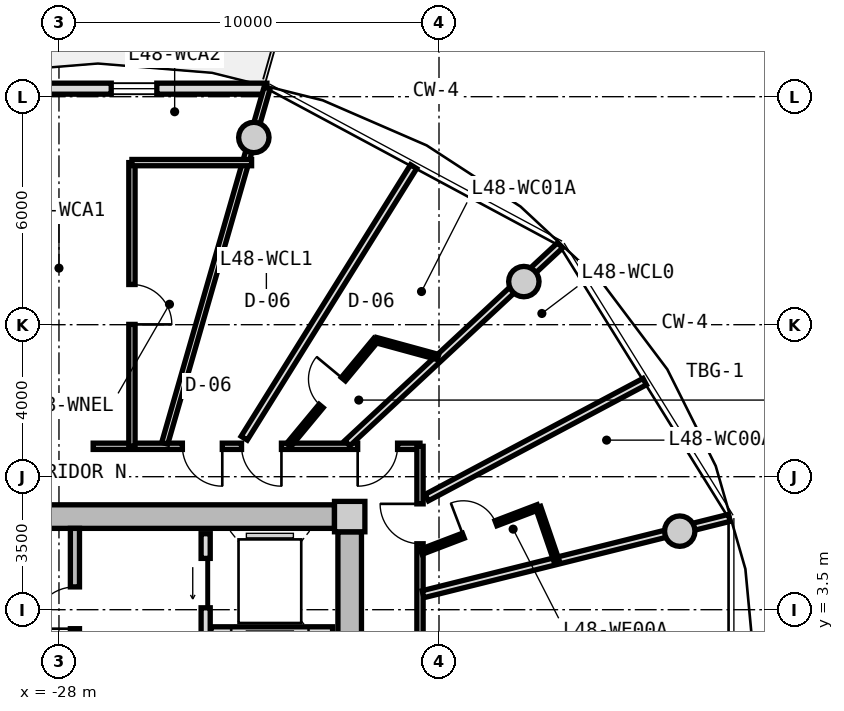
"""IFC4 building model, lengths in metres.
Left out: names, types, materials, properties, quantities, classifications, styles, units other than length and angle.
Written with IfcOpenShell. Run it as: python <this file> out.ifc"""

import sys

from ifc_helpers import new_model, si_unit, direction, frame, frame_2d, origin, origin_2d, place, context, subcontext, project, spatial, rectangle, circle, extrude, source, transform, mapped, element, fill, save


model = new_model("IFC4")
c1 = context("Model", 3, precision=1e-05, world=origin(), true_north=direction((0.0, 1.0)))
c2 = subcontext(c1, "Body", "Model", "MODEL_VIEW")
j1 = project(units=[si_unit("LENGTHUNIT", "METRE"), si_unit("PLANEANGLEUNIT", "RADIAN")], contexts=[c1])
p1 = place(None, origin())
s1 = spatial("IfcSite", under=j1, at=p1, CompositionType="ELEMENT")
p2 = place(p1, origin())
s2 = spatial("IfcBuilding", under=s1, at=p2, CompositionType="ELEMENT")
p3 = place(p2, frame((0.0, 0.0, 155.65)))
s3 = spatial("IfcBuildingStorey", under=s2, at=p3, CompositionType="ELEMENT", Elevation=155.65)
m1 = source(origin(), c2, "Body", "SweptSolid", [
    extrude(rectangle(XDim=0.8, YDim=0.8, at=origin_2d()), origin(), (0.0, 0.0, 1.0), 3.05),
])
p4 = place(p3, frame((-20.35, 5.95, 0.0), z_axis=(0.0, 0.0, 1.0), x_axis=(1.0, 0.0, 0.0)))
e1 = element("IfcColumn", 1, at=p4, inside=s3, PredefinedType="COLUMN", context=c2, shape_type="MappedRepresentation", body=[
    mapped(m1, transform((0.0, 0.0, 0.0), x_axis=(1.0, 0.0, 0.0), y_axis=(0.0, 1.0, 0.0), z_axis=(0.0, 0.0, 1.0), scale=1.0)),
])
m2 = source(origin(), c2, "Body", "SweptSolid", [
    extrude(rectangle(XDim=14.5, YDim=0.62, at=frame_2d((7.25, 0.0))), origin(), (0.0, 0.0, 1.0), 2.81),
])
p5 = place(p3, frame((-35.25, 5.95, 0.0), z_axis=(0.0, 0.0, 1.0), x_axis=(1.0, 0.0, 0.0)))
e2 = element("IfcWall", 2, at=p5, inside=s3, PredefinedType="SHEAR", context=c2, shape_type="MappedRepresentation", body=[
    mapped(m2, transform((0.0, 0.0, 0.0), x_axis=(1.0, 0.0, 0.0), y_axis=(0.0, 1.0, 0.0), z_axis=(0.0, 0.0, 1.0), scale=1.0)),
])
m3 = source(origin(), c2, "Body", "SweptSolid", [
    extrude(rectangle(XDim=11.1, YDim=0.62, at=frame_2d((5.55, 0.0))), origin(), (0.0, 0.0, 1.0), 2.81),
])
p6 = place(p3, frame((-20.35, 5.55, 0.0), z_axis=(0.0, 0.0, 1.0), x_axis=(0.0, -1.0, 0.0)))
e3 = element("IfcWall", 3, at=p6, inside=s3, PredefinedType="SHEAR", context=c2, shape_type="MappedRepresentation", body=[
    mapped(m3, transform((0.0, 0.0, 0.0), x_axis=(1.0, 0.0, 0.0), y_axis=(0.0, 1.0, 0.0), z_axis=(0.0, 0.0, 1.0), scale=1.0)),
])
p7 = place(p6, frame((5.65, 0.0, 0.0)))
e4 = element("IfcOpeningElement", 4, at=p7, cuts=e3, PredefinedType="OPENING", context=c2, shape_type="SweptSolid", body=[
    extrude(rectangle(XDim=1.2, YDim=2.15, at=frame_2d((0.6, 1.075))), frame((0.0, 0.32, 0.0), z_axis=(0.0, -1.0, 0.0), x_axis=(1.0, 0.0, 0.0)), (0.0, 0.0, 1.0), 0.64),
])
m4 = source(origin(), c2, "Body", "SweptSolid", [
    extrude(circle(Radius=0.4, at=origin_2d()), origin(), (0.0, 0.0, 1.0), 3.05),
])
for number, where, z_axis, x_axis in (
    (5, (-11.665, 5.567, 0.0), (0.0, 0.0, 1.0), (1.0, 0.0, 0.0)),
    (6, (-15.767, 12.135, 0.0), (0.0, 0.0, 1.0), (1.0, 0.0, 0.0)),
    (7, (-22.873, 15.926, 0.0), (0.0, 0.0, 1.0), (1.0, 0.0, 0.0)),
):
    element("IfcColumn", number, at=place(p3, frame(where, z_axis=z_axis, x_axis=x_axis)), inside=s3, PredefinedType="COLUMN", context=c2, shape_type="MappedRepresentation", body=[
        mapped(m4, transform((0.0, 0.0, 0.0), x_axis=(1.0, 0.0, 0.0), y_axis=(0.0, 1.0, 0.0), z_axis=(0.0, 0.0, 1.0), scale=1.0)),
    ])
m5 = source(origin(), c2, "Body", "SweptSolid", [
    extrude(rectangle(XDim=8.893, YDim=0.29, at=frame_2d((4.447, 0.0))), origin(), (0.0, 0.0, 1.0), 2.81),
])
p8 = place(p3, frame((-31.422, 17.211, 0.0), z_axis=(0.0, 0.0, 1.0), x_axis=(1.0, 0.0, 0.0)))
e8 = element("IfcWall", 8, at=p8, inside=s3, PredefinedType="SOLIDWALL", context=c2, shape_type="MappedRepresentation", body=[
    mapped(m5, transform((0.0, 0.0, 0.0), x_axis=(1.0, 0.0, 0.0), y_axis=(0.0, 1.0, 0.0), z_axis=(0.0, 0.0, 1.0), scale=1.0)),
])
p9 = place(p8, frame((0.9, 0.0, 0.0)))
e9 = element("IfcOpeningElement", 9, at=p9, cuts=e8, PredefinedType="OPENING", context=c2, shape_type="SweptSolid", body=[
    extrude(rectangle(XDim=1.15, YDim=2.25, at=frame_2d((0.575, 1.125))), frame((0.0, 0.155, 0.0), z_axis=(0.0, -1.0, 0.0), x_axis=(1.0, 0.0, 0.0)), (0.0, 0.0, 1.0), 0.31),
])
p10 = place(p8, frame((4.796, 0.0, 0.85)))
e10 = element("IfcOpeningElement", 10, at=p10, cuts=e8, PredefinedType="OPENING", context=c2, shape_type="SweptSolid", body=[
    extrude(rectangle(XDim=1.2, YDim=1.5, at=frame_2d((0.6, 0.75))), frame((0.0, 0.155, 0.0), z_axis=(0.0, -1.0, 0.0), x_axis=(1.0, 0.0, 0.0)), (0.0, 0.0, 1.0), 0.31),
])
m6 = source(origin(), c2, "Body", "SweptSolid", [
    extrude(rectangle(XDim=3.19, YDim=0.24, at=frame_2d((1.595, 0.0))), origin(), (0.0, 0.0, 1.0), 2.81),
])
p11 = place(p3, frame((-27.58, 2.45, 0.0), z_axis=(0.0, 0.0, 1.0), x_axis=(0.0, 1.0, 0.0)))
e11 = element("IfcWall", 11, at=p11, inside=s3, PredefinedType="PARTITIONING", context=c2, shape_type="MappedRepresentation", body=[
    mapped(m6, transform((0.0, 0.0, 0.0), x_axis=(1.0, 0.0, 0.0), y_axis=(0.0, 1.0, 0.0), z_axis=(0.0, 0.0, 1.0), scale=1.0)),
])
p12 = place(p11, frame((0.55, 0.0, 0.0)))
e12 = element("IfcOpeningElement", 12, at=p12, cuts=e11, PredefinedType="OPENING", context=c2, shape_type="SweptSolid", body=[
    extrude(rectangle(XDim=1.1, YDim=2.15, at=frame_2d((0.55, 1.075))), frame((0.0, 0.13, 0.0), z_axis=(0.0, -1.0, 0.0), x_axis=(1.0, 0.0, 0.0)), (0.0, 0.0, 1.0), 0.26),
])
m7 = source(origin(), c2, "Body", "SweptSolid", [
    extrude(rectangle(XDim=5.0, YDim=0.24, at=frame_2d((2.5, 0.0))), origin(), (0.0, 0.0, 1.0), 2.795),
])
p13 = place(p3, frame((-24.14, 0.5, 0.0), z_axis=(0.0, 0.0, 1.0), x_axis=(0.0, 1.0, 0.0)))
e13 = element("IfcWall", 13, at=p13, inside=s3, PredefinedType="PARTITIONING", context=c2, shape_type="MappedRepresentation", body=[
    mapped(m7, transform((0.0, 0.0, 0.0), x_axis=(1.0, 0.0, 0.0), y_axis=(0.0, 1.0, 0.0), z_axis=(0.0, 0.0, 1.0), scale=1.0)),
])
p14 = place(p13, frame((3.05, 0.0, 0.0)))
e14 = element("IfcOpeningElement", 14, at=p14, cuts=e13, PredefinedType="OPENING", context=c2, shape_type="SweptSolid", body=[
    extrude(rectangle(XDim=1.3, YDim=2.2, at=frame_2d((0.65, 1.1))), frame((0.0, 0.13, 0.0), z_axis=(0.0, -1.0, 0.0), x_axis=(1.0, 0.0, 0.0)), (0.0, 0.0, 1.0), 0.26),
])
p15 = place(p13, frame((0.55, 0.0, 0.0)))
e15 = element("IfcOpeningElement", 15, at=p15, cuts=e13, PredefinedType="OPENING", context=c2, shape_type="SweptSolid", body=[
    extrude(rectangle(XDim=1.3, YDim=2.2, at=frame_2d((0.65, 1.1))), frame((0.0, 0.13, 0.0), z_axis=(0.0, -1.0, 0.0), x_axis=(1.0, 0.0, 0.0)), (0.0, 0.0, 1.0), 0.26),
])
m8 = source(origin(), c2, "Body", "SweptSolid", [
    extrude(rectangle(XDim=3.2, YDim=0.2, at=frame_2d((1.6, 0.0))), origin(), (0.0, 0.0, 1.0), 2.795),
])
p16 = place(p3, frame((-24.0, 2.95, 0.0), z_axis=(0.0, 0.0, 1.0), x_axis=(1.0, 0.0, 0.0)))
e16 = element("IfcWall", 16, at=p16, inside=s3, PredefinedType="PARTITIONING", context=c2, shape_type="MappedRepresentation", body=[
    mapped(m8, transform((0.0, 0.0, 0.0), x_axis=(1.0, 0.0, 0.0), y_axis=(0.0, 1.0, 0.0), z_axis=(0.0, 0.0, 1.0), scale=1.0)),
])
m9 = source(origin(), c2, "Body", "SweptSolid", [
    extrude(rectangle(XDim=8.6, YDim=0.165, at=frame_2d((4.3, 0.0))), origin(), (0.0, 0.0, 1.0), 2.795),
])
p17 = place(p3, frame((-27.1, 7.8, 0.0), z_axis=(0.0, 0.0, 1.0), x_axis=(1.0, 0.0, 0.0)))
e17 = element("IfcWall", 17, at=p17, inside=s3, PredefinedType="PARTITIONING", context=c2, shape_type="MappedRepresentation", body=[
    mapped(m9, transform((0.0, 0.0, 0.0), x_axis=(1.0, 0.0, 0.0), y_axis=(0.0, 1.0, 0.0), z_axis=(0.0, 0.0, 1.0), scale=1.0)),
])
p18 = place(p17, frame((6.96, 0.0, 0.0)))
e18 = element("IfcOpeningElement", 18, at=p18, cuts=e17, PredefinedType="OPENING", context=c2, shape_type="SweptSolid", body=[
    extrude(rectangle(XDim=1.05, YDim=2.15, at=frame_2d((0.525, 1.075))), frame((0.0, 0.093, 0.0), z_axis=(0.0, -1.0, 0.0), x_axis=(1.0, 0.0, 0.0)), (0.0, 0.0, 1.0), 0.185),
])
p19 = place(p17, frame((3.904, 0.0, 0.0)))
e19 = element("IfcOpeningElement", 19, at=p19, cuts=e17, PredefinedType="OPENING", context=c2, shape_type="SweptSolid", body=[
    extrude(rectangle(XDim=1.05, YDim=2.15, at=frame_2d((0.525, 1.075))), frame((0.0, 0.093, 0.0), z_axis=(0.0, -1.0, 0.0), x_axis=(1.0, 0.0, 0.0)), (0.0, 0.0, 1.0), 0.185),
])
p20 = place(p17, frame((2.347, 0.0, 0.0)))
e20 = element("IfcOpeningElement", 20, at=p20, cuts=e17, PredefinedType="OPENING", context=c2, shape_type="SweptSolid", body=[
    extrude(rectangle(XDim=1.05, YDim=2.15, at=frame_2d((0.525, 1.075))), frame((0.0, 0.093, 0.0), z_axis=(0.0, -1.0, 0.0), x_axis=(1.0, 0.0, 0.0)), (0.0, 0.0, 1.0), 0.185),
])
m10 = source(origin(), c2, "Body", "SweptSolid", [
    extrude(rectangle(XDim=15.6, YDim=0.165, at=frame_2d((7.8, 0.0))), origin(), (0.0, 0.0, 1.0), 2.795),
])
p21 = place(p3, frame((-18.5, 7.8, 0.0), z_axis=(0.0, 0.0, 1.0), x_axis=(0.0, -1.0, 0.0)))
e21 = element("IfcWall", 21, at=p21, inside=s3, PredefinedType="PARTITIONING", context=c2, shape_type="MappedRepresentation", body=[
    mapped(m10, transform((0.0, 0.0, 0.0), x_axis=(1.0, 0.0, 0.0), y_axis=(0.0, 1.0, 0.0), z_axis=(0.0, 0.0, 1.0), scale=1.0)),
])
p22 = place(p21, frame((8.314, 0.0, 0.0)))
e22 = element("IfcOpeningElement", 22, at=p22, cuts=e21, PredefinedType="OPENING", context=c2, shape_type="SweptSolid", body=[
    extrude(rectangle(XDim=1.25, YDim=2.2, at=frame_2d((0.625, 1.1))), frame((0.0, 0.093, 0.0), z_axis=(0.0, -1.0, 0.0), x_axis=(1.0, 0.0, 0.0)), (0.0, 0.0, 1.0), 0.185),
])
p23 = place(p21, frame((1.515, 0.0, 0.0)))
e23 = element("IfcOpeningElement", 23, at=p23, cuts=e21, PredefinedType="OPENING", context=c2, shape_type="SweptSolid", body=[
    extrude(rectangle(XDim=1.05, YDim=2.15, at=frame_2d((0.525, 1.075))), frame((0.0, 0.093, 0.0), z_axis=(0.0, -1.0, 0.0), x_axis=(1.0, 0.0, 0.0)), (0.0, 0.0, 1.0), 0.185),
])
m11 = source(origin(), c2, "Body", "SweptSolid", [
    extrude(rectangle(XDim=9.73, YDim=0.165, at=frame_2d((4.865, 0.0))), origin(), (0.0, 0.0, 1.0), 2.345),
])
p24 = place(p3, frame((-25.217, 7.88, 0.0), z_axis=(0.0, 0.0, 1.0), x_axis=(0.27679492614, 0.960929013436, 0.0)))
e24 = element("IfcWall", 24, at=p24, inside=s3, PredefinedType="PARTITIONING", context=c2, shape_type="MappedRepresentation", body=[
    mapped(m11, transform((0.0, 0.0, 0.0), x_axis=(1.0, 0.0, 0.0), y_axis=(0.0, 1.0, 0.0), z_axis=(0.0, 0.0, 1.0), scale=1.0)),
])
m12 = source(origin(), c2, "Body", "SweptSolid", [
    extrude(rectangle(XDim=7.465, YDim=0.165, at=frame_2d((3.733, 0.0))), origin(), (0.0, 0.0, 1.0), 2.795),
])
p25 = place(p3, frame((-26.08, 7.8, 0.0), z_axis=(0.0, 0.0, 1.0), x_axis=(0.0, 1.0, 0.0)))
e25 = element("IfcWall", 25, at=p25, inside=s3, PredefinedType="PARTITIONING", context=c2, shape_type="MappedRepresentation", body=[
    mapped(m12, transform((0.0, 0.0, 0.0), x_axis=(1.0, 0.0, 0.0), y_axis=(0.0, 1.0, 0.0), z_axis=(0.0, 0.0, 1.0), scale=1.0)),
])
p26 = place(p25, frame((3.208, 0.0, 0.0)))
e26 = element("IfcOpeningElement", 26, at=p26, cuts=e25, PredefinedType="OPENING", context=c2, shape_type="SweptSolid", body=[
    extrude(rectangle(XDim=1.05, YDim=2.15, at=frame_2d((0.525, 1.075))), frame((0.0, 0.093, 0.0), z_axis=(0.0, -1.0, 0.0), x_axis=(1.0, 0.0, 0.0)), (0.0, 0.0, 1.0), 0.185),
])
m13 = source(origin(), c2, "Body", "SweptSolid", [
    extrude(rectangle(XDim=3.149, YDim=0.165, at=frame_2d((1.574, 0.0))), origin(), (0.0, 0.0, 1.0), 2.795),
])
p27 = place(p3, frame((-26.08, 15.265, 0.0), z_axis=(0.0, 0.0, 1.0), x_axis=(1.0, 0.0, 0.0)))
e27 = element("IfcWall", 27, at=p27, inside=s3, PredefinedType="PARTITIONING", context=c2, shape_type="MappedRepresentation", body=[
    mapped(m13, transform((0.0, 0.0, 0.0), x_axis=(1.0, 0.0, 0.0), y_axis=(0.0, 1.0, 0.0), z_axis=(0.0, 0.0, 1.0), scale=1.0)),
])
m14 = source(origin(), c2, "Body", "SweptSolid", [
    extrude(rectangle(XDim=8.305, YDim=0.19, at=frame_2d((4.153, 0.0))), origin(), (0.0, 0.0, 1.0), 2.345),
])
p28 = place(p3, frame((-18.42, 3.908, 0.0), z_axis=(0.0, 0.0, 1.0), x_axis=(0.970309994378, 0.241864662175, 0.0)))
e28 = element("IfcWall", 28, at=p28, inside=s3, PredefinedType="PARTITIONING", context=c2, shape_type="MappedRepresentation", body=[
    mapped(m14, transform((0.0, 0.0, 0.0), x_axis=(1.0, 0.0, 0.0), y_axis=(0.0, 1.0, 0.0), z_axis=(0.0, 0.0, 1.0), scale=1.0)),
])
m15 = source(origin(), c2, "Body", "SweptSolid", [
    extrude(rectangle(XDim=7.648, YDim=0.19, at=frame_2d((3.824, 0.0))), origin(), (0.0, 0.0, 1.0), 2.345),
])
p29 = place(p3, frame((-20.413, 7.88, 0.0), z_axis=(0.0, 0.0, 1.0), x_axis=(0.732182665826, 0.681108320213, 0.0)))
e29 = element("IfcWall", 29, at=p29, inside=s3, PredefinedType="PARTITIONING", context=c2, shape_type="MappedRepresentation", body=[
    mapped(m15, transform((0.0, 0.0, 0.0), x_axis=(1.0, 0.0, 0.0), y_axis=(0.0, 1.0, 0.0), z_axis=(0.0, 0.0, 1.0), scale=1.0)),
])
m16 = source(origin(), c2, "Body", "SweptSolid", [
    extrude(rectangle(XDim=6.499, YDim=0.19, at=frame_2d((3.25, 0.0))), origin(), (0.0, 0.0, 1.0), 2.795),
])
p30 = place(p3, frame((-18.324, 6.449, 0.0), z_axis=(0.0, 0.0, 1.0), x_axis=(0.882715595921, 0.469907625729, 0.0)))
e30 = element("IfcWall", 30, at=p30, inside=s3, PredefinedType="PARTITIONING", context=c2, shape_type="MappedRepresentation", body=[
    mapped(m16, transform((0.0, 0.0, 0.0), x_axis=(1.0, 0.0, 0.0), y_axis=(0.0, 1.0, 0.0), z_axis=(0.0, 0.0, 1.0), scale=1.0)),
])
m17 = source(origin(), c2, "Body", "SweptSolid", [
    extrude(rectangle(XDim=3.295, YDim=0.14, at=frame_2d((1.647, 0.0))), origin(), (0.0, 0.0, 1.0), 2.795),
])
p31 = place(p3, frame((-18.47, 5.023, 0.0), z_axis=(0.0, 0.0, 1.0), x_axis=(0.934202224769, 0.356743890258, 0.0)))
e31 = element("IfcWall", 31, at=p31, inside=s3, PredefinedType="PARTITIONING", context=c2, shape_type="MappedRepresentation", body=[
    mapped(m17, transform((0.0, 0.0, 0.0), x_axis=(1.0, 0.0, 0.0), y_axis=(0.0, 1.0, 0.0), z_axis=(0.0, 0.0, 1.0), scale=1.0)),
])
p32 = place(p31, frame((1.188, 0.0, 0.0)))
e32 = element("IfcOpeningElement", 32, at=p32, cuts=e31, PredefinedType="OPENING", context=c2, shape_type="SweptSolid", body=[
    extrude(rectangle(XDim=0.92, YDim=2.1, at=frame_2d((0.46, 1.05))), frame((0.0, 0.08, 0.0), z_axis=(0.0, -1.0, 0.0), x_axis=(1.0, 0.0, 0.0)), (0.0, 0.0, 1.0), 0.16),
])
m18 = source(origin(), c2, "Body", "SweptSolid", [
    extrude(rectangle(XDim=1.479, YDim=0.14, at=frame_2d((0.739, 0.0))), origin(), (0.0, 0.0, 1.0), 2.795),
])
p33 = place(p3, frame((-15.392, 6.198, 0.0), z_axis=(0.0, 0.0, 1.0), x_axis=(0.324438293903, -0.945906862989, 0.0)))
e33 = element("IfcWall", 33, at=p33, inside=s3, PredefinedType="PARTITIONING", context=c2, shape_type="MappedRepresentation", body=[
    mapped(m18, transform((0.0, 0.0, 0.0), x_axis=(1.0, 0.0, 0.0), y_axis=(0.0, 1.0, 0.0), z_axis=(0.0, 0.0, 1.0), scale=1.0)),
])
m19 = source(origin(), c2, "Body", "SweptSolid", [
    extrude(rectangle(XDim=8.422, YDim=0.19, at=frame_2d((4.211, 0.0))), origin(), (0.0, 0.0, 1.0), 2.795),
])
p34 = place(p3, frame((-23.125, 8.014, 0.0), z_axis=(0.0, 0.0, 1.0), x_axis=(0.52925352896, 0.848463730565, 0.0)))
e34 = element("IfcWall", 34, at=p34, inside=s3, PredefinedType="PARTITIONING", context=c2, shape_type="MappedRepresentation", body=[
    mapped(m19, transform((0.0, 0.0, 0.0), x_axis=(1.0, 0.0, 0.0), y_axis=(0.0, 1.0, 0.0), z_axis=(0.0, 0.0, 1.0), scale=1.0)),
])
m20 = source(origin(), c2, "Body", "SweptSolid", [
    extrude(rectangle(XDim=3.593, YDim=0.14, at=frame_2d((1.797, 0.0))), origin(), (0.0, 0.0, 1.0), 2.795),
])
p35 = place(p3, frame((-21.955, 7.83, 0.0), z_axis=(0.0, 0.0, 1.0), x_axis=(0.638271060163, 0.769811700196, 0.0)))
e35 = element("IfcWall", 35, at=p35, inside=s3, PredefinedType="PARTITIONING", context=c2, shape_type="MappedRepresentation", body=[
    mapped(m20, transform((0.0, 0.0, 0.0), x_axis=(1.0, 0.0, 0.0), y_axis=(0.0, 1.0, 0.0), z_axis=(0.0, 0.0, 1.0), scale=1.0)),
])
p36 = place(p35, frame((1.337, 0.0, 0.0)))
e36 = element("IfcOpeningElement", 36, at=p36, cuts=e35, PredefinedType="OPENING", context=c2, shape_type="SweptSolid", body=[
    extrude(rectangle(XDim=0.92, YDim=2.1, at=frame_2d((0.46, 1.05))), frame((0.0, 0.08, 0.0), z_axis=(0.0, -1.0, 0.0), x_axis=(1.0, 0.0, 0.0)), (0.0, 0.0, 1.0), 0.16),
])
m21 = source(origin(), c2, "Body", "SweptSolid", [
    extrude(rectangle(XDim=1.697, YDim=0.14, at=frame_2d((0.848, 0.0))), origin(), (0.0, 0.0, 1.0), 2.795),
])
p37 = place(p3, frame((-19.662, 10.596, 0.0), z_axis=(0.0, 0.0, 1.0), x_axis=(0.964667458123, -0.263470482671, 0.0)))
e37 = element("IfcWall", 37, at=p37, inside=s3, PredefinedType="PARTITIONING", context=c2, shape_type="MappedRepresentation", body=[
    mapped(m21, transform((0.0, 0.0, 0.0), x_axis=(1.0, 0.0, 0.0), y_axis=(0.0, 1.0, 0.0), z_axis=(0.0, 0.0, 1.0), scale=1.0)),
])
m22 = source(origin(), c2, "Body", "SweptSolid", [
    extrude(rectangle(XDim=1.2, YDim=1.5, at=frame_2d((0.6, 0.75))), frame((0.0, 0.03, 0.0), z_axis=(0.0, -1.0, 0.0), x_axis=(1.0, 0.0, 0.0)), (0.0, 0.0, 1.0), 0.06),
])
p38 = place(p10, origin())
e38 = element("IfcWindow", 38, at=p38, inside=s3, PartitioningType="SINGLE_PANEL", PredefinedType="WINDOW", context=c2, shape_type="MappedRepresentation", body=[
    mapped(m22, transform((0.0, 0.0, 0.0), x_axis=(1.0, 0.0, 0.0), y_axis=(0.0, 1.0, 0.0), z_axis=(0.0, 0.0, 1.0), scale=1.0)),
])
fill(e10, e38)
m23 = source(origin(), c2, "Body", "SweptSolid", [
    extrude(rectangle(XDim=1.1, YDim=2.15, at=frame_2d((0.55, 1.075))), frame((0.0, 0.025, 0.0), z_axis=(0.0, -1.0, 0.0), x_axis=(1.0, 0.0, 0.0)), (0.0, 0.0, 1.0), 0.05),
])
p39 = place(p12, origin())
e39 = element("IfcDoor", 39, at=p39, inside=s3, OperationType="SINGLE_SWING_LEFT", PredefinedType="DOOR", context=c2, shape_type="MappedRepresentation", body=[
    mapped(m23, transform((0.0, 0.0, 0.0), x_axis=(1.0, 0.0, 0.0), y_axis=(0.0, 1.0, 0.0), z_axis=(0.0, 0.0, 1.0), scale=1.0)),
])
fill(e12, e39)
m24 = source(origin(), c2, "Body", "SweptSolid", [
    extrude(rectangle(XDim=1.3, YDim=2.2, at=frame_2d((0.65, 1.1))), frame((0.0, 0.025, 0.0), z_axis=(0.0, -1.0, 0.0), x_axis=(1.0, 0.0, 0.0)), (0.0, 0.0, 1.0), 0.05),
])
p40 = place(p14, origin())
e40 = element("IfcDoor", 40, at=p40, inside=s3, OperationType="SLIDING_TO_LEFT", PredefinedType="DOOR", context=c2, shape_type="MappedRepresentation", body=[
    mapped(m24, transform((0.0, 0.0, 0.0), x_axis=(1.0, 0.0, 0.0), y_axis=(0.0, 1.0, 0.0), z_axis=(0.0, 0.0, 1.0), scale=1.0)),
])
fill(e14, e40)
m25 = source(origin(), c2, "Body", "SweptSolid", [
    extrude(rectangle(XDim=1.05, YDim=2.15, at=frame_2d((0.525, 1.075))), frame((0.0, 0.025, 0.0), z_axis=(0.0, -1.0, 0.0), x_axis=(1.0, 0.0, 0.0)), (0.0, 0.0, 1.0), 0.05),
])
p41 = place(p26, frame((1.05, 0.0, 0.0), z_axis=(0.0, 0.0, 1.0), x_axis=(-1.0, 0.0, 0.0)))
e41 = element("IfcDoor", 41, at=p41, inside=s3, OperationType="SINGLE_SWING_RIGHT", PredefinedType="DOOR", context=c2, shape_type="MappedRepresentation", body=[
    mapped(m25, transform((0.0, 0.0, 0.0), x_axis=(1.0, 0.0, 0.0), y_axis=(0.0, 1.0, 0.0), z_axis=(0.0, 0.0, 1.0), scale=1.0)),
])
fill(e26, e41)
p42 = place(p23, frame((1.05, 0.0, 0.0), z_axis=(0.0, 0.0, 1.0), x_axis=(-1.0, 0.0, 0.0)))
e42 = element("IfcDoor", 42, at=p42, inside=s3, OperationType="SINGLE_SWING_RIGHT", PredefinedType="DOOR", context=c2, shape_type="MappedRepresentation", body=[
    mapped(m25, transform((0.0, 0.0, 0.0), x_axis=(1.0, 0.0, 0.0), y_axis=(0.0, 1.0, 0.0), z_axis=(0.0, 0.0, 1.0), scale=1.0)),
])
fill(e23, e42)
m26 = source(origin(), c2, "Body", "SweptSolid", [
    extrude(rectangle(XDim=0.92, YDim=2.1, at=frame_2d((0.46, 1.05))), frame((0.0, 0.025, 0.0), z_axis=(0.0, -1.0, 0.0), x_axis=(1.0, 0.0, 0.0)), (0.0, 0.0, 1.0), 0.05),
])
p43 = place(p32, origin())
e43 = element("IfcDoor", 43, at=p43, inside=s3, OperationType="SINGLE_SWING_LEFT", PredefinedType="DOOR", context=c2, shape_type="MappedRepresentation", body=[
    mapped(m26, transform((0.0, 0.0, 0.0), x_axis=(1.0, 0.0, 0.0), y_axis=(0.0, 1.0, 0.0), z_axis=(0.0, 0.0, 1.0), scale=1.0)),
])
fill(e32, e43)
p44 = place(p18, frame((1.05, 0.0, 0.0), z_axis=(0.0, 0.0, 1.0), x_axis=(-1.0, 0.0, 0.0)))
e44 = element("IfcDoor", 44, at=p44, inside=s3, OperationType="SINGLE_SWING_RIGHT", PredefinedType="DOOR", context=c2, shape_type="MappedRepresentation", body=[
    mapped(m25, transform((0.0, 0.0, 0.0), x_axis=(1.0, 0.0, 0.0), y_axis=(0.0, 1.0, 0.0), z_axis=(0.0, 0.0, 1.0), scale=1.0)),
])
fill(e18, e44)
p45 = place(p19, frame((1.05, 0.0, 0.0), z_axis=(0.0, 0.0, 1.0), x_axis=(-1.0, 0.0, 0.0)))
e45 = element("IfcDoor", 45, at=p45, inside=s3, OperationType="SINGLE_SWING_LEFT", PredefinedType="DOOR", context=c2, shape_type="MappedRepresentation", body=[
    mapped(m25, transform((0.0, 0.0, 0.0), x_axis=(1.0, 0.0, 0.0), y_axis=(0.0, 1.0, 0.0), z_axis=(0.0, 0.0, 1.0), scale=1.0)),
])
fill(e19, e45)
p46 = place(p36, origin())
e46 = element("IfcDoor", 46, at=p46, inside=s3, OperationType="SINGLE_SWING_RIGHT", PredefinedType="DOOR", context=c2, shape_type="MappedRepresentation", body=[
    mapped(m26, transform((0.0, 0.0, 0.0), x_axis=(1.0, 0.0, 0.0), y_axis=(0.0, 1.0, 0.0), z_axis=(0.0, 0.0, 1.0), scale=1.0)),
])
fill(e36, e46)
p47 = place(p20, frame((1.05, 0.0, 0.0), z_axis=(0.0, 0.0, 1.0), x_axis=(-1.0, 0.0, 0.0)))
e47 = element("IfcDoor", 47, at=p47, inside=s3, OperationType="SINGLE_SWING_LEFT", PredefinedType="DOOR", context=c2, shape_type="MappedRepresentation", body=[
    mapped(m25, transform((0.0, 0.0, 0.0), x_axis=(1.0, 0.0, 0.0), y_axis=(0.0, 1.0, 0.0), z_axis=(0.0, 0.0, 1.0), scale=1.0)),
])
fill(e20, e47)
save(model, sys.argv[1])
